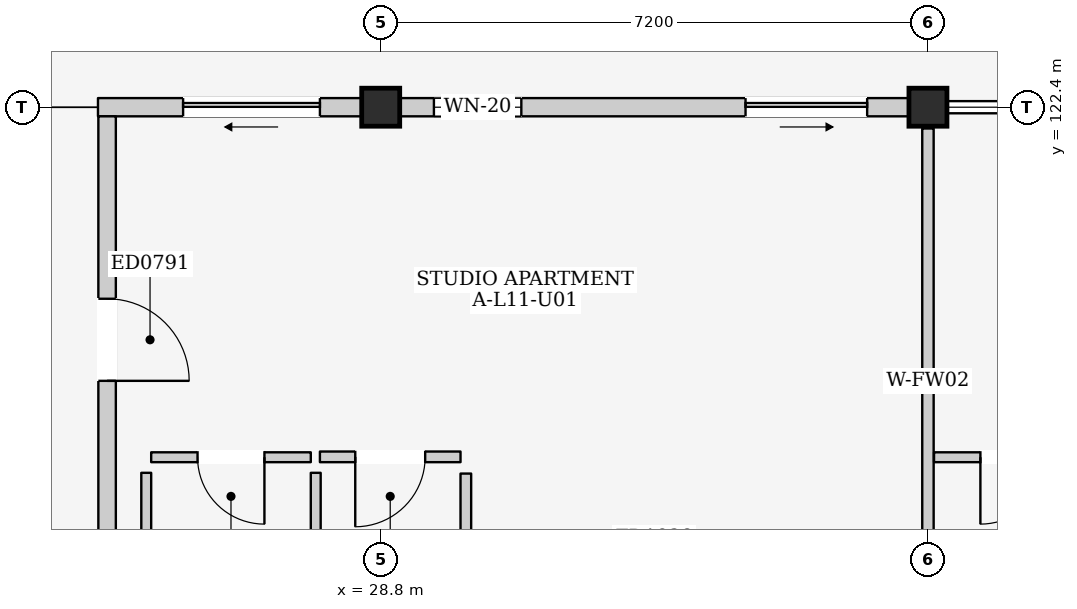
"""IFC4 building model, lengths in metres.
Left out: names, types, materials, properties, quantities, classifications, styles, units other than length and angle.
Written with IfcOpenShell. Run it as: python <this file> out.ifc"""

import sys

from ifc_helpers import new_model, si_unit, direction, frame, frame_2d, origin, origin_2d, place, context, subcontext, project, spatial, rectangle, extrude, element, fill, save


model = new_model("IFC4")
c1 = context("Model", 3, precision=1e-05, world=origin(), true_north=direction((0.0, 1.0)))
c2 = subcontext(c1, "Body", "Model", "MODEL_VIEW")
j1 = project(units=[si_unit("LENGTHUNIT", "METRE"), si_unit("PLANEANGLEUNIT", "RADIAN")], contexts=[c1])
p1 = place(None, origin())
s1 = spatial("IfcSite", under=j1, at=p1, CompositionType="ELEMENT")
p2 = place(p1, origin())
s2 = spatial("IfcBuilding", under=s1, at=p2, CompositionType="ELEMENT")
p3 = place(p2, frame((0.0, 0.0, 38.0)))
s3 = spatial("IfcBuildingStorey", under=s2, at=p3, CompositionType="ELEMENT", Elevation=38.0)
for number, where, z_axis, x_axis in (
    (1, (28.8, 122.4, 0.0), (0.0, 0.0, 1.0), (1.0, 0.0, 0.0)),
    (2, (36.0, 122.4, 0.0), (0.0, 0.0, 1.0), (1.0, 0.0, 0.0)),
):
    element("IfcColumn", number, at=place(p3, frame(where, z_axis=z_axis, x_axis=x_axis)), inside=s3, PredefinedType="COLUMN", context=c2, shape_type="SweptSolid", body=[
        extrude(rectangle(XDim=0.5, YDim=0.5, at=origin_2d()), origin(), (0.0, 0.0, 1.0), 3.2),
    ])
p4 = place(p3, frame((25.08, 122.4, 0.0), z_axis=(0.0, 0.0, 1.0), x_axis=(1.0, 0.0, 0.0)))
e3 = element("IfcWall", 3, at=p4, inside=s3, PredefinedType="ELEMENTEDWALL", context=c2, shape_type="SweptSolid", body=[
    extrude(rectangle(XDim=3.47, YDim=0.24, at=frame_2d((1.735, 0.0))), origin(), (0.0, 0.0, 1.0), 2.325),
])
p5 = place(p4, frame((1.12, 0.0, 0.0)))
e4 = element("IfcOpeningElement", 4, at=p5, cuts=e3, PredefinedType="OPENING", context=c2, shape_type="SweptSolid", body=[
    extrude(rectangle(XDim=1.8, YDim=2.12, at=frame_2d((0.9, 1.06))), frame((0.0, 0.135, 0.0), z_axis=(0.0, -1.0, 0.0), x_axis=(1.0, 0.0, 0.0)), (0.0, 0.0, 1.0), 0.27),
])
p6 = place(p3, frame((29.05, 122.4, 0.0), z_axis=(0.0, 0.0, 1.0), x_axis=(1.0, 0.0, 0.0)))
e5 = element("IfcWall", 5, at=p6, inside=s3, PredefinedType="ELEMENTEDWALL", context=c2, shape_type="SweptSolid", body=[
    extrude(rectangle(XDim=6.7, YDim=0.24, at=frame_2d((3.35, 0.0))), origin(), (0.0, 0.0, 1.0), 2.525),
])
p7 = place(p6, frame((4.55, 0.0, 0.0)))
e6 = element("IfcOpeningElement", 6, at=p7, cuts=e5, PredefinedType="OPENING", context=c2, shape_type="SweptSolid", body=[
    extrude(rectangle(XDim=1.6, YDim=2.12, at=frame_2d((0.8, 1.06))), frame((0.0, 0.135, 0.0), z_axis=(0.0, -1.0, 0.0), x_axis=(1.0, 0.0, 0.0)), (0.0, 0.0, 1.0), 0.27),
])
p8 = place(p6, frame((0.45, 0.0, 0.9)))
e7 = element("IfcOpeningElement", 7, at=p8, cuts=e5, PredefinedType="OPENING", context=c2, shape_type="SweptSolid", body=[
    extrude(rectangle(XDim=1.15, YDim=1.15, at=frame_2d((0.575, 0.575))), frame((0.0, 0.135, 0.0), z_axis=(0.0, -1.0, 0.0), x_axis=(1.0, 0.0, 0.0)), (0.0, 0.0, 1.0), 0.27),
])
p9 = place(p3, frame((25.2, 115.2, 0.0), z_axis=(0.0, 0.0, 1.0), x_axis=(0.0, 1.0, 0.0)))
e8 = element("IfcWall", 8, at=p9, inside=s3, PredefinedType="ELEMENTEDWALL", context=c2, shape_type="SweptSolid", body=[
    extrude(rectangle(XDim=7.08, YDim=0.23, at=frame_2d((3.54, 0.0))), origin(), (0.0, 0.0, 1.0), 2.425),
])
p10 = place(p9, frame((3.6, 0.0, 0.0)))
e9 = element("IfcOpeningElement", 9, at=p10, cuts=e8, PredefinedType="OPENING", context=c2, shape_type="SweptSolid", body=[
    extrude(rectangle(XDim=1.08, YDim=2.12, at=frame_2d((0.54, 1.06))), frame((0.0, 0.13, 0.0), z_axis=(0.0, -1.0, 0.0), x_axis=(1.0, 0.0, 0.0)), (0.0, 0.0, 1.0), 0.26),
])
p11 = place(p3, frame((36.0, 115.48, 0.0), z_axis=(0.0, 0.0, 1.0), x_axis=(0.0, 1.0, 0.0)))
e10 = element("IfcWall", 10, at=p11, inside=s3, PredefinedType="PARTITIONING", context=c2, shape_type="SweptSolid", body=[
    extrude(rectangle(XDim=6.64, YDim=0.15, at=frame_2d((3.32, 0.0))), origin(), (0.0, 0.0, 1.0), 2.475),
])
p12 = place(p3, frame((25.78, 117.795, 0.0), z_axis=(0.0, 0.0, 1.0), x_axis=(1.0, 0.0, 0.0)))
e11 = element("IfcWall", 11, at=p12, inside=s3, PredefinedType="PARTITIONING", context=c2, shape_type="SweptSolid", body=[
    extrude(rectangle(XDim=2.1, YDim=0.13, at=frame_2d((1.05, 0.0))), origin(), (0.0, 0.0, 1.0), 2.99),
])
p13 = place(p12, frame((0.61, 0.0, 0.0)))
e12 = element("IfcOpeningElement", 12, at=p13, cuts=e11, PredefinedType="OPENING", context=c2, shape_type="SweptSolid", body=[
    extrude(rectangle(XDim=0.88, YDim=2.1, at=frame_2d((0.44, 1.05))), frame((0.0, 0.08, 0.0), z_axis=(0.0, -1.0, 0.0), x_axis=(1.0, 0.0, 0.0)), (0.0, 0.0, 1.0), 0.16),
])
for number, where, z_axis, x_axis in (
    (13, (27.945, 115.46, 0.0), (0.0, 0.0, 1.0), (0.0, 1.0, 0.0)),
    (14, (25.715, 115.46, 0.0), (0.0, 0.0, 1.0), (0.0, 1.0, 0.0)),
):
    element("IfcWall", number, at=place(p3, frame(where, z_axis=z_axis, x_axis=x_axis)), inside=s3, PredefinedType="PARTITIONING", context=c2, shape_type="SweptSolid", body=[
        extrude(rectangle(XDim=2.13, YDim=0.13, at=frame_2d((1.065, 0.0))), origin(), (0.0, 0.0, 1.0), 2.99),
    ])
p14 = place(p3, frame((28.0, 117.8, 0.0), z_axis=(0.0, 0.0, 1.0), x_axis=(1.0, 0.0, 0.0)))
e15 = element("IfcWall", 15, at=p14, inside=s3, PredefinedType="PARTITIONING", context=c2, shape_type="SweptSolid", body=[
    extrude(rectangle(XDim=1.85, YDim=0.14, at=frame_2d((0.925, 0.0))), origin(), (0.0, 0.0, 1.0), 2.99),
])
p15 = place(p14, frame((0.465, 0.0, 0.0)))
e16 = element("IfcOpeningElement", 16, at=p15, cuts=e15, PredefinedType="OPENING", context=c2, shape_type="SweptSolid", body=[
    extrude(rectangle(XDim=0.92, YDim=2.1, at=frame_2d((0.46, 1.05))), frame((0.0, 0.085, 0.0), z_axis=(0.0, -1.0, 0.0), x_axis=(1.0, 0.0, 0.0)), (0.0, 0.0, 1.0), 0.17),
])
p16 = place(p3, frame((29.92, 115.43, 0.0), z_axis=(0.0, 0.0, 1.0), x_axis=(0.0, 1.0, 0.0)))
e17 = element("IfcWall", 17, at=p16, inside=s3, PredefinedType="PARTITIONING", context=c2, shape_type="SweptSolid", body=[
    extrude(rectangle(XDim=2.15, YDim=0.14, at=frame_2d((1.075, 0.0))), origin(), (0.0, 0.0, 1.0), 2.99),
])
p17 = place(p3, frame((36.08, 117.795, 0.0), z_axis=(0.0, 0.0, 1.0), x_axis=(1.0, 0.0, 0.0)))
e18 = element("IfcWall", 18, at=p17, inside=s3, PredefinedType="PARTITIONING", context=c2, shape_type="SweptSolid", body=[
    extrude(rectangle(XDim=2.1, YDim=0.13, at=frame_2d((1.05, 0.0))), origin(), (0.0, 0.0, 1.0), 2.99),
])
p18 = place(p17, frame((0.61, 0.0, 0.0)))
e19 = element("IfcOpeningElement", 19, at=p18, cuts=e18, PredefinedType="OPENING", context=c2, shape_type="SweptSolid", body=[
    extrude(rectangle(XDim=0.88, YDim=2.1, at=frame_2d((0.44, 1.05))), frame((0.0, 0.08, 0.0), z_axis=(0.0, -1.0, 0.0), x_axis=(1.0, 0.0, 0.0)), (0.0, 0.0, 1.0), 0.16),
])
p19 = place(p5, frame((1.8, 0.0, 0.0), z_axis=(0.0, 0.0, 1.0), x_axis=(-1.0, 0.0, 0.0)))
e20 = element("IfcDoor", 20, at=p19, inside=s3, OperationType="SLIDING_TO_LEFT", PredefinedType="DOOR", context=c2, shape_type="SweptSolid", body=[
    extrude(rectangle(XDim=1.8, YDim=2.12, at=frame_2d((0.9, 1.06))), frame((0.0, 0.025, 0.0), z_axis=(0.0, -1.0, 0.0), x_axis=(1.0, 0.0, 0.0)), (0.0, 0.0, 1.0), 0.05),
])
fill(e4, e20)
p20 = place(p7, frame((1.6, 0.0, 0.0), z_axis=(0.0, 0.0, 1.0), x_axis=(-1.0, 0.0, 0.0)))
e21 = element("IfcDoor", 21, at=p20, inside=s3, OperationType="SLIDING_TO_RIGHT", PredefinedType="DOOR", context=c2, shape_type="SweptSolid", body=[
    extrude(rectangle(XDim=1.6, YDim=2.12, at=frame_2d((0.8, 1.06))), frame((0.0, 0.025, 0.0), z_axis=(0.0, -1.0, 0.0), x_axis=(1.0, 0.0, 0.0)), (0.0, 0.0, 1.0), 0.05),
])
fill(e6, e21)
p21 = place(p8, origin())
e22 = element("IfcWindow", 22, at=p21, inside=s3, PartitioningType="SINGLE_PANEL", PredefinedType="WINDOW", context=c2, shape_type="SweptSolid", body=[
    extrude(rectangle(XDim=1.15, YDim=1.15, at=frame_2d((0.575, 0.575))), frame((0.0, 0.03, 0.0), z_axis=(0.0, -1.0, 0.0), x_axis=(1.0, 0.0, 0.0)), (0.0, 0.0, 1.0), 0.06),
])
fill(e7, e22)
p22 = place(p10, frame((1.08, 0.0, 0.0), z_axis=(0.0, 0.0, 1.0), x_axis=(-1.0, 0.0, 0.0)))
e23 = element("IfcDoor", 23, at=p22, inside=s3, OperationType="SINGLE_SWING_RIGHT", PredefinedType="DOOR", context=c2, shape_type="SweptSolid", body=[
    extrude(rectangle(XDim=1.08, YDim=2.12, at=frame_2d((0.54, 1.06))), frame((0.0, 0.025, 0.0), z_axis=(0.0, -1.0, 0.0), x_axis=(1.0, 0.0, 0.0)), (0.0, 0.0, 1.0), 0.05),
])
fill(e9, e23)
p23 = place(p13, frame((0.88, 0.0, 0.0), z_axis=(0.0, 0.0, 1.0), x_axis=(-1.0, 0.0, 0.0)))
e24 = element("IfcDoor", 24, at=p23, inside=s3, OperationType="SINGLE_SWING_LEFT", PredefinedType="DOOR", context=c2, shape_type="SweptSolid", body=[
    extrude(rectangle(XDim=0.88, YDim=2.1, at=frame_2d((0.44, 1.05))), frame((0.0, 0.025, 0.0), z_axis=(0.0, -1.0, 0.0), x_axis=(1.0, 0.0, 0.0)), (0.0, 0.0, 1.0), 0.05),
])
fill(e12, e24)
p24 = place(p15, frame((0.92, 0.0, 0.0), z_axis=(0.0, 0.0, 1.0), x_axis=(-1.0, 0.0, 0.0)))
e25 = element("IfcDoor", 25, at=p24, inside=s3, OperationType="SINGLE_SWING_RIGHT", PredefinedType="DOOR", context=c2, shape_type="SweptSolid", body=[
    extrude(rectangle(XDim=0.92, YDim=2.1, at=frame_2d((0.46, 1.05))), frame((0.0, 0.025, 0.0), z_axis=(0.0, -1.0, 0.0), x_axis=(1.0, 0.0, 0.0)), (0.0, 0.0, 1.0), 0.05),
])
fill(e16, e25)
p25 = place(p18, frame((0.88, 0.0, 0.0), z_axis=(0.0, 0.0, 1.0), x_axis=(-1.0, 0.0, 0.0)))
e26 = element("IfcDoor", 26, at=p25, inside=s3, OperationType="SINGLE_SWING_RIGHT", PredefinedType="DOOR", context=c2, shape_type="SweptSolid", body=[
    extrude(rectangle(XDim=0.88, YDim=2.1, at=frame_2d((0.44, 1.05))), frame((0.0, 0.025, 0.0), z_axis=(0.0, -1.0, 0.0), x_axis=(1.0, 0.0, 0.0)), (0.0, 0.0, 1.0), 0.05),
])
fill(e19, e26)
save(model, sys.argv[1])
